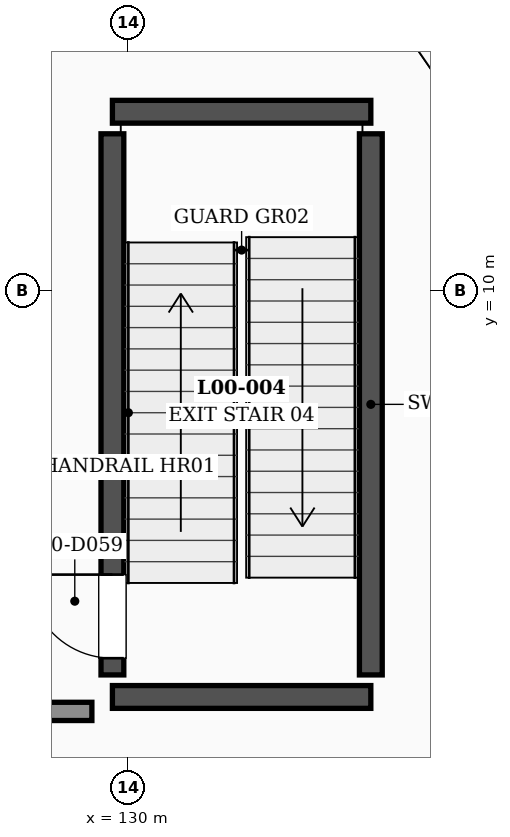
"""IFC4 building model, lengths in metres.
Left out: names, types, materials, properties, quantities, classifications, styles, units other than length and angle.
Written with IfcOpenShell. Run it as: python <this file> out.ifc"""

import sys

from ifc_helpers import new_model, si_unit, direction, frame, frame_2d, origin, place, context, subcontext, project, spatial, rectangle, extrude, element, fill, save


model = new_model("IFC4")
c1 = context("Model", 3, precision=1e-05, world=origin(), true_north=direction((0.0, 1.0)))
c2 = subcontext(c1, "Body", "Model", "MODEL_VIEW")
j1 = project(units=[si_unit("LENGTHUNIT", "METRE"), si_unit("PLANEANGLEUNIT", "RADIAN")], contexts=[c1])
p1 = place(None, origin())
s1 = spatial("IfcSite", under=j1, at=p1, CompositionType="ELEMENT")
p2 = place(p1, origin())
s2 = spatial("IfcBuilding", under=s1, at=p2, CompositionType="ELEMENT")
p3 = place(p2, origin())
s3 = spatial("IfcBuildingStorey", under=s2, at=p3, CompositionType="ELEMENT", Elevation=0.0)
for number, where, z_axis, x_axis in (
    (1, (129.8, 4.65, 0.0), (0.0, 0.0, 1.0), (1.0, 0.0, 0.0)),
    (2, (129.8, 12.35, 0.0), (0.0, 0.0, 1.0), (1.0, 0.0, 0.0)),
):
    element("IfcWall", number, at=place(p3, frame(where, z_axis=z_axis, x_axis=x_axis)), inside=s3, PredefinedType="SHEAR", context=c2, shape_type="SweptSolid", body=[
        extrude(rectangle(XDim=3.4, YDim=0.3, at=frame_2d((1.7, 0.0))), origin(), (0.0, 0.0, 1.0), 6.0),
    ])
p4 = place(p3, frame((129.8, 4.94, 0.0), z_axis=(0.0, 0.0, 1.0), x_axis=(0.0, 1.0, 0.0)))
e3 = element("IfcWall", 3, at=p4, inside=s3, PredefinedType="SHEAR", context=c2, shape_type="SweptSolid", body=[
    extrude(rectangle(XDim=7.12, YDim=0.3, at=frame_2d((3.56, 0.0))), origin(), (0.0, 0.0, 1.0), 6.0),
])
p5 = place(p4, frame((0.22, 0.0, 0.0)))
e4 = element("IfcOpeningElement", 4, at=p5, cuts=e3, PredefinedType="OPENING", context=c2, shape_type="SweptSolid", body=[
    extrude(rectangle(XDim=1.1, YDim=2.2, at=frame_2d((0.55, 1.1))), frame((0.0, 0.16, 0.0), z_axis=(0.0, -1.0, 0.0), x_axis=(1.0, 0.0, 0.0)), (0.0, 0.0, 1.0), 0.32),
])
p6 = place(p3, frame((133.2, 4.94, 0.0), z_axis=(0.0, 0.0, 1.0), x_axis=(0.0, 1.0, 0.0)))
e5 = element("IfcWall", 5, at=p6, inside=s3, PredefinedType="SHEAR", context=c2, shape_type="SweptSolid", body=[
    extrude(rectangle(XDim=7.12, YDim=0.3, at=frame_2d((3.56, 0.0))), origin(), (0.0, 0.0, 1.0), 6.0),
])
p7 = place(p3, frame((125.78, 4.46, 0.0), z_axis=(0.0, 0.0, 1.0), x_axis=(1.0, 0.0, 0.0)))
e6 = element("IfcWall", 6, at=p7, inside=s3, PredefinedType="PARTITIONING", context=c2, shape_type="SweptSolid", body=[
    extrude(rectangle(XDim=3.75, YDim=0.24, at=frame_2d((1.875, 0.0))), origin(), (0.0, 0.0, 1.0), 4.78),
])
p8 = place(p3, frame((139.262, 4.971, 0.0), z_axis=(0.0, 0.0, 1.0), x_axis=(-0.951842519604, -0.306587373964, 0.0)))
e7 = element("IfcWall", 7, at=p8, inside=s3, PredefinedType="PARTITIONING", context=c2, shape_type="SweptSolid", body=[
    extrude(rectangle(XDim=9.84, YDim=0.24, at=frame_2d((4.92, 0.0))), origin(), (0.0, 0.0, 1.0), 4.83),
])
p9 = place(p5, origin())
e8 = element("IfcDoor", 8, at=p9, inside=s3, OperationType="SINGLE_SWING_RIGHT", PredefinedType="DOOR", context=c2, shape_type="SweptSolid", body=[
    extrude(rectangle(XDim=1.1, YDim=2.2, at=frame_2d((0.55, 1.1))), frame((0.0, 0.025, 0.0), z_axis=(0.0, -1.0, 0.0), x_axis=(1.0, 0.0, 0.0)), (0.0, 0.0, 1.0), 0.05),
])
fill(e4, e8)
save(model, sys.argv[1])
